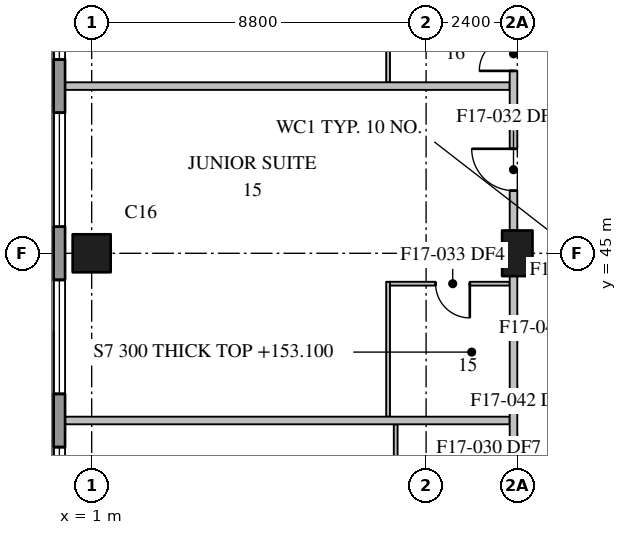
"""IFC4 building model, lengths in metres.
Left out: names, types, materials, properties, quantities, classifications, styles, units other than length and angle.
Written with IfcOpenShell. Run it as: python <this file> out.ifc"""

import sys

from ifc_helpers import new_model, si_unit, direction, frame, frame_2d, origin, origin_2d, place, context, subcontext, project, spatial, rectangle, extrude, element, fill, save


model = new_model("IFC4")
c1 = context("Model", 3, precision=1e-05, world=origin(), true_north=direction((0.0, 1.0)))
c2 = subcontext(c1, "Body", "Model", "MODEL_VIEW")
j1 = project(units=[si_unit("LENGTHUNIT", "METRE"), si_unit("PLANEANGLEUNIT", "RADIAN")], contexts=[c1])
p1 = place(None, origin())
s1 = spatial("IfcSite", under=j1, at=p1, CompositionType="ELEMENT")
p2 = place(p1, origin())
s2 = spatial("IfcBuilding", under=s1, at=p2, CompositionType="ELEMENT")
p3 = place(p2, frame((0.0, 0.0, 153.1)))
s3 = spatial("IfcBuildingStorey", under=s2, at=p3, CompositionType="ELEMENT", Elevation=153.1)
p4 = place(p3, frame((1.0, 45.0, 0.0), z_axis=(0.0, 0.0, 1.0), x_axis=(1.0, 0.0, 0.0)))
e1 = element("IfcColumn", 1, at=p4, inside=s3, PredefinedType="COLUMN", context=c2, shape_type="SweptSolid", body=[
    extrude(rectangle(XDim=1.0, YDim=1.0, at=origin_2d()), origin(), (0.0, 0.0, 1.0), 3.7),
])
p5 = place(p3, frame((12.2, 45.0, 0.0), z_axis=(0.0, 0.0, 1.0), x_axis=(0.0, 1.0, 0.0)))
e2 = element("IfcColumn", 2, at=p5, inside=s3, PredefinedType="COLUMN", context=c2, shape_type="SweptSolid", body=[
    extrude(rectangle(XDim=1.2, YDim=0.8, at=origin_2d()), origin(), (0.0, 0.0, 1.0), 3.7),
])
p6 = place(p3, frame((0.15, 61.1, 0.0), z_axis=(0.0, 0.0, 1.0), x_axis=(0.0, -1.0, 0.0)))
e3 = element("IfcWall", 3, at=p6, inside=s3, PredefinedType="STANDARD", context=c2, shape_type="SweptSolid", body=[
    extrude(rectangle(XDim=58.9, YDim=0.3, at=frame_2d((29.45, 0.0))), origin(), (0.0, 0.0, 1.0), 3.4),
])
p7 = place(p6, frame((3.6, 0.0, 0.75)))
e4 = element("IfcOpeningElement", 4, at=p7, cuts=e3, PredefinedType="OPENING", context=c2, shape_type="SweptSolid", body=[
    extrude(rectangle(XDim=3.0, YDim=2.3, at=frame_2d((1.5, 1.15))), frame((0.0, 0.16, 0.0), z_axis=(0.0, -1.0, 0.0), x_axis=(1.0, 0.0, 0.0)), (0.0, 0.0, 1.0), 0.32),
])
p8 = place(p6, frame((8.0, 0.0, 0.75)))
e5 = element("IfcOpeningElement", 5, at=p8, cuts=e3, PredefinedType="OPENING", context=c2, shape_type="SweptSolid", body=[
    extrude(rectangle(XDim=3.0, YDim=2.3, at=frame_2d((1.5, 1.15))), frame((0.0, 0.16, 0.0), z_axis=(0.0, -1.0, 0.0), x_axis=(1.0, 0.0, 0.0)), (0.0, 0.0, 1.0), 0.32),
])
p9 = place(p6, frame((12.4, 0.0, 0.75)))
e6 = element("IfcOpeningElement", 6, at=p9, cuts=e3, PredefinedType="OPENING", context=c2, shape_type="SweptSolid", body=[
    extrude(rectangle(XDim=3.0, YDim=2.3, at=frame_2d((1.5, 1.15))), frame((0.0, 0.16, 0.0), z_axis=(0.0, -1.0, 0.0), x_axis=(1.0, 0.0, 0.0)), (0.0, 0.0, 1.0), 0.32),
])
p10 = place(p6, frame((16.8, 0.0, 0.75)))
e7 = element("IfcOpeningElement", 7, at=p10, cuts=e3, PredefinedType="OPENING", context=c2, shape_type="SweptSolid", body=[
    extrude(rectangle(XDim=3.0, YDim=2.3, at=frame_2d((1.5, 1.15))), frame((0.0, 0.16, 0.0), z_axis=(0.0, -1.0, 0.0), x_axis=(1.0, 0.0, 0.0)), (0.0, 0.0, 1.0), 0.32),
])
p11 = place(p6, frame((21.2, 0.0, 0.75)))
e8 = element("IfcOpeningElement", 8, at=p11, cuts=e3, PredefinedType="OPENING", context=c2, shape_type="SweptSolid", body=[
    extrude(rectangle(XDim=3.0, YDim=2.3, at=frame_2d((1.5, 1.15))), frame((0.0, 0.16, 0.0), z_axis=(0.0, -1.0, 0.0), x_axis=(1.0, 0.0, 0.0)), (0.0, 0.0, 1.0), 0.32),
])
p12 = place(p6, frame((25.6, 0.0, 0.75)))
e9 = element("IfcOpeningElement", 9, at=p12, cuts=e3, PredefinedType="OPENING", context=c2, shape_type="SweptSolid", body=[
    extrude(rectangle(XDim=3.0, YDim=2.3, at=frame_2d((1.5, 1.15))), frame((0.0, 0.16, 0.0), z_axis=(0.0, -1.0, 0.0), x_axis=(1.0, 0.0, 0.0)), (0.0, 0.0, 1.0), 0.32),
])
p13 = place(p6, frame((30.0, 0.0, 0.75)))
e10 = element("IfcOpeningElement", 10, at=p13, cuts=e3, PredefinedType="OPENING", context=c2, shape_type="SweptSolid", body=[
    extrude(rectangle(XDim=3.0, YDim=2.3, at=frame_2d((1.5, 1.15))), frame((0.0, 0.16, 0.0), z_axis=(0.0, -1.0, 0.0), x_axis=(1.0, 0.0, 0.0)), (0.0, 0.0, 1.0), 0.32),
])
p14 = place(p6, frame((34.4, 0.0, 0.75)))
e11 = element("IfcOpeningElement", 11, at=p14, cuts=e3, PredefinedType="OPENING", context=c2, shape_type="SweptSolid", body=[
    extrude(rectangle(XDim=3.0, YDim=2.3, at=frame_2d((1.5, 1.15))), frame((0.0, 0.16, 0.0), z_axis=(0.0, -1.0, 0.0), x_axis=(1.0, 0.0, 0.0)), (0.0, 0.0, 1.0), 0.32),
])
p15 = place(p6, frame((38.8, 0.0, 0.75)))
e12 = element("IfcOpeningElement", 12, at=p15, cuts=e3, PredefinedType="OPENING", context=c2, shape_type="SweptSolid", body=[
    extrude(rectangle(XDim=3.0, YDim=2.3, at=frame_2d((1.5, 1.15))), frame((0.0, 0.16, 0.0), z_axis=(0.0, -1.0, 0.0), x_axis=(1.0, 0.0, 0.0)), (0.0, 0.0, 1.0), 0.32),
])
p16 = place(p6, frame((43.2, 0.0, 0.75)))
e13 = element("IfcOpeningElement", 13, at=p16, cuts=e3, PredefinedType="OPENING", context=c2, shape_type="SweptSolid", body=[
    extrude(rectangle(XDim=3.0, YDim=2.3, at=frame_2d((1.5, 1.15))), frame((0.0, 0.16, 0.0), z_axis=(0.0, -1.0, 0.0), x_axis=(1.0, 0.0, 0.0)), (0.0, 0.0, 1.0), 0.32),
])
p17 = place(p6, frame((47.6, 0.0, 0.75)))
e14 = element("IfcOpeningElement", 14, at=p17, cuts=e3, PredefinedType="OPENING", context=c2, shape_type="SweptSolid", body=[
    extrude(rectangle(XDim=3.0, YDim=2.3, at=frame_2d((1.5, 1.15))), frame((0.0, 0.16, 0.0), z_axis=(0.0, -1.0, 0.0), x_axis=(1.0, 0.0, 0.0)), (0.0, 0.0, 1.0), 0.32),
])
p18 = place(p6, frame((52.0, 0.0, 0.75)))
e15 = element("IfcOpeningElement", 15, at=p18, cuts=e3, PredefinedType="OPENING", context=c2, shape_type="SweptSolid", body=[
    extrude(rectangle(XDim=3.0, YDim=2.3, at=frame_2d((1.5, 1.15))), frame((0.0, 0.16, 0.0), z_axis=(0.0, -1.0, 0.0), x_axis=(1.0, 0.0, 0.0)), (0.0, 0.0, 1.0), 0.32),
])
p19 = place(p3, frame((12.1, 36.8, 0.0), z_axis=(0.0, 0.0, 1.0), x_axis=(0.0, 1.0, 0.0)))
e16 = element("IfcWall", 16, at=p19, inside=s3, PredefinedType="PARTITIONING", context=c2, shape_type="SweptSolid", body=[
    extrude(rectangle(XDim=7.6, YDim=0.2, at=frame_2d((3.8, 0.0))), origin(), (0.0, 0.0, 1.0), 3.4),
])
p20 = place(p19, frame((0.05, 0.0, 0.0)))
e17 = element("IfcOpeningElement", 17, at=p20, cuts=e16, PredefinedType="OPENING", context=c2, shape_type="SweptSolid", body=[
    extrude(rectangle(XDim=1.0, YDim=2.1, at=frame_2d((0.5, 1.05))), frame((0.0, 0.11, 0.0), z_axis=(0.0, -1.0, 0.0), x_axis=(1.0, 0.0, 0.0)), (0.0, 0.0, 1.0), 0.22),
])
p21 = place(p3, frame((12.1, 45.6, 0.0), z_axis=(0.0, 0.0, 1.0), x_axis=(0.0, 1.0, 0.0)))
e18 = element("IfcWall", 18, at=p21, inside=s3, PredefinedType="PARTITIONING", context=c2, shape_type="SweptSolid", body=[
    extrude(rectangle(XDim=7.6, YDim=0.2, at=frame_2d((3.8, 0.0))), origin(), (0.0, 0.0, 1.0), 3.4),
])
p22 = place(p21, frame((1.05, 0.0, 0.0)))
e19 = element("IfcOpeningElement", 19, at=p22, cuts=e18, PredefinedType="OPENING", context=c2, shape_type="SweptSolid", body=[
    extrude(rectangle(XDim=1.1, YDim=2.1, at=frame_2d((0.55, 1.05))), frame((0.0, 0.11, 0.0), z_axis=(0.0, -1.0, 0.0), x_axis=(1.0, 0.0, 0.0)), (0.0, 0.0, 1.0), 0.22),
])
p23 = place(p21, frame((6.45, 0.0, 0.0)))
e20 = element("IfcOpeningElement", 20, at=p23, cuts=e18, PredefinedType="OPENING", context=c2, shape_type="SweptSolid", body=[
    extrude(rectangle(XDim=0.9, YDim=2.1, at=frame_2d((0.45, 1.05))), frame((0.0, 0.11, 0.0), z_axis=(0.0, -1.0, 0.0), x_axis=(1.0, 0.0, 0.0)), (0.0, 0.0, 1.0), 0.22),
])
p24 = place(p21, frame((4.2, 0.0, 0.0)))
e21 = element("IfcOpeningElement", 21, at=p24, cuts=e18, PredefinedType="OPENING", context=c2, shape_type="SweptSolid", body=[
    extrude(rectangle(XDim=0.9, YDim=2.1, at=frame_2d((0.45, 1.05))), frame((0.0, 0.11, 0.0), z_axis=(0.0, -1.0, 0.0), x_axis=(1.0, 0.0, 0.0)), (0.0, 0.0, 1.0), 0.22),
])
for number, where, z_axis, x_axis in (
    (22, (0.31, 40.6, 0.0), (0.0, 0.0, 1.0), (1.0, 0.0, 0.0)),
    (23, (0.31, 49.4, 0.0), (0.0, 0.0, 1.0), (1.0, 0.0, 0.0)),
):
    element("IfcWall", number, at=place(p3, frame(where, z_axis=z_axis, x_axis=x_axis)), inside=s3, PredefinedType="PARTITIONING", context=c2, shape_type="SweptSolid", body=[
        extrude(rectangle(XDim=11.69, YDim=0.2, at=frame_2d((5.845, 0.0))), origin(), (0.0, 0.0, 1.0), 3.4),
    ])
p25 = place(p3, frame((8.8, 40.7, 0.0), z_axis=(0.0, 0.0, 1.0), x_axis=(0.0, 1.0, 0.0)))
e24 = element("IfcWall", 24, at=p25, inside=s3, PredefinedType="PARTITIONING", context=c2, shape_type="SweptSolid", body=[
    extrude(rectangle(XDim=3.55, YDim=0.1, at=frame_2d((1.775, 0.0))), origin(), (0.0, 0.0, 1.0), 3.4),
])
p26 = place(p3, frame((8.8, 49.5, 0.0), z_axis=(0.0, 0.0, 1.0), x_axis=(0.0, 1.0, 0.0)))
e25 = element("IfcWall", 25, at=p26, inside=s3, PredefinedType="PARTITIONING", context=c2, shape_type="SweptSolid", body=[
    extrude(rectangle(XDim=1.65, YDim=0.1, at=frame_2d((0.825, 0.0))), origin(), (0.0, 0.0, 1.0), 3.4),
])
p27 = place(p3, frame((9.0, 38.25, 0.0), z_axis=(0.0, 0.0, 1.0), x_axis=(0.0, 1.0, 0.0)))
e26 = element("IfcWall", 26, at=p27, inside=s3, PredefinedType="PARTITIONING", context=c2, shape_type="SweptSolid", body=[
    extrude(rectangle(XDim=2.25, YDim=0.1, at=frame_2d((1.125, 0.0))), origin(), (0.0, 0.0, 1.0), 3.4),
])
p28 = place(p3, frame((12.0, 44.2, 0.0), z_axis=(0.0, 0.0, 1.0), x_axis=(-1.0, 0.0, 0.0)))
e27 = element("IfcWall", 27, at=p28, inside=s3, PredefinedType="PARTITIONING", context=c2, shape_type="SweptSolid", body=[
    extrude(rectangle(XDim=3.15, YDim=0.1, at=frame_2d((1.575, 0.0))), origin(), (0.0, 0.0, 1.0), 3.4),
])
p29 = place(p28, frame((1.05, 0.0, 0.0)))
e28 = element("IfcOpeningElement", 28, at=p29, cuts=e27, PredefinedType="OPENING", context=c2, shape_type="SweptSolid", body=[
    extrude(rectangle(XDim=0.9, YDim=2.1, at=frame_2d((0.45, 1.05))), frame((0.0, 0.06, 0.0), z_axis=(0.0, -1.0, 0.0), x_axis=(1.0, 0.0, 0.0)), (0.0, 0.0, 1.0), 0.12),
])
p30 = place(p8, origin())
e29 = element("IfcWindow", 29, at=p30, inside=s3, PartitioningType="SINGLE_PANEL", PredefinedType="WINDOW", context=c2, shape_type="SweptSolid", body=[
    extrude(rectangle(XDim=3.0, YDim=2.3, at=frame_2d((1.5, 1.15))), frame((0.0, 0.03, 0.0), z_axis=(0.0, -1.0, 0.0), x_axis=(1.0, 0.0, 0.0)), (0.0, 0.0, 1.0), 0.06),
])
fill(e5, e29)
p31 = place(p9, origin())
e30 = element("IfcWindow", 30, at=p31, inside=s3, PartitioningType="SINGLE_PANEL", PredefinedType="WINDOW", context=c2, shape_type="SweptSolid", body=[
    extrude(rectangle(XDim=3.0, YDim=2.3, at=frame_2d((1.5, 1.15))), frame((0.0, 0.03, 0.0), z_axis=(0.0, -1.0, 0.0), x_axis=(1.0, 0.0, 0.0)), (0.0, 0.0, 1.0), 0.06),
])
fill(e6, e30)
p32 = place(p10, origin())
e31 = element("IfcWindow", 31, at=p32, inside=s3, PartitioningType="SINGLE_PANEL", PredefinedType="WINDOW", context=c2, shape_type="SweptSolid", body=[
    extrude(rectangle(XDim=3.0, YDim=2.3, at=frame_2d((1.5, 1.15))), frame((0.0, 0.03, 0.0), z_axis=(0.0, -1.0, 0.0), x_axis=(1.0, 0.0, 0.0)), (0.0, 0.0, 1.0), 0.06),
])
fill(e7, e31)
p33 = place(p11, origin())
e32 = element("IfcWindow", 32, at=p33, inside=s3, PartitioningType="SINGLE_PANEL", PredefinedType="WINDOW", context=c2, shape_type="SweptSolid", body=[
    extrude(rectangle(XDim=3.0, YDim=2.3, at=frame_2d((1.5, 1.15))), frame((0.0, 0.03, 0.0), z_axis=(0.0, -1.0, 0.0), x_axis=(1.0, 0.0, 0.0)), (0.0, 0.0, 1.0), 0.06),
])
fill(e8, e32)
p34 = place(p22, origin())
e33 = element("IfcDoor", 33, at=p34, inside=s3, OperationType="SINGLE_SWING_RIGHT", PredefinedType="DOOR", context=c2, shape_type="SweptSolid", body=[
    extrude(rectangle(XDim=1.1, YDim=2.1, at=frame_2d((0.55, 1.05))), frame((0.0, 0.025, 0.0), z_axis=(0.0, -1.0, 0.0), x_axis=(1.0, 0.0, 0.0)), (0.0, 0.0, 1.0), 0.05),
])
fill(e19, e33)
p35 = place(p29, origin())
e34 = element("IfcDoor", 34, at=p35, inside=s3, OperationType="SINGLE_SWING_LEFT", PredefinedType="DOOR", context=c2, shape_type="SweptSolid", body=[
    extrude(rectangle(XDim=0.9, YDim=2.1, at=frame_2d((0.45, 1.05))), frame((0.0, 0.025, 0.0), z_axis=(0.0, -1.0, 0.0), x_axis=(1.0, 0.0, 0.0)), (0.0, 0.0, 1.0), 0.05),
])
fill(e28, e34)
p36 = place(p24, origin())
e35 = element("IfcDoor", 35, at=p36, inside=s3, OperationType="SINGLE_SWING_LEFT", PredefinedType="DOOR", context=c2, shape_type="SweptSolid", body=[
    extrude(rectangle(XDim=0.9, YDim=2.1, at=frame_2d((0.45, 1.05))), frame((0.0, 0.025, 0.0), z_axis=(0.0, -1.0, 0.0), x_axis=(1.0, 0.0, 0.0)), (0.0, 0.0, 1.0), 0.05),
])
fill(e21, e35)
save(model, sys.argv[1])
